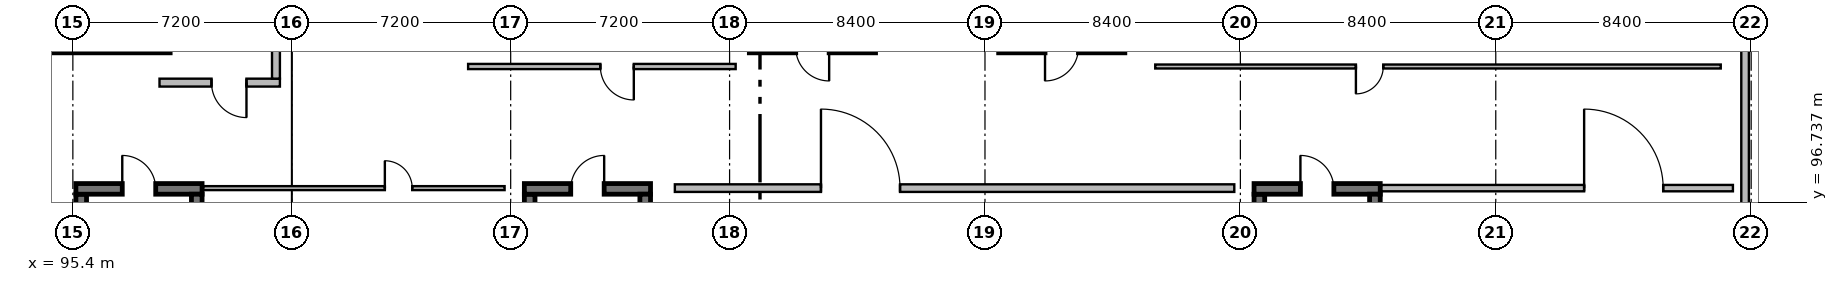
"""IFC4 building model, lengths in metres.
Left out: names, types, materials, properties, quantities, classifications, styles, units other than length and angle.
Written with IfcOpenShell. Run it as: python <this file> out.ifc"""

import sys

from ifc_helpers import new_model, si_unit, direction, frame, frame_2d, origin, place, context, subcontext, project, spatial, rectangle, extrude, element, fill, save


model = new_model("IFC4")
c1 = context("Model", 3, precision=1e-05, world=origin(), true_north=direction((0.0, 1.0)))
c2 = subcontext(c1, "Body", "Model", "MODEL_VIEW")
j1 = project(units=[si_unit("LENGTHUNIT", "METRE"), si_unit("PLANEANGLEUNIT", "RADIAN")], contexts=[c1])
p1 = place(None, origin())
s1 = spatial("IfcSite", under=j1, at=p1, CompositionType="ELEMENT")
p2 = place(p1, origin())
s2 = spatial("IfcBuilding", under=s1, at=p2, CompositionType="ELEMENT")
p3 = place(p2, origin())
s3 = spatial("IfcBuildingStorey", under=s2, at=p3, CompositionType="ELEMENT", Elevation=0.0)
p4 = place(p3, frame((98.6, 101.825, 0.0), z_axis=(0.0, 0.0, 1.0), x_axis=(-1.0, 0.0, 0.0)))
e1 = element("IfcWall", 1, at=p4, inside=s3, PredefinedType="SOLIDWALL", context=c2, shape_type="SweptSolid", body=[
    extrude(rectangle(XDim=4.15, YDim=0.35, at=frame_2d((2.075, 0.0))), origin(), (0.0, 0.0, 1.0), 4.8),
])
p5 = place(p3, frame((95.675, 89.2, 0.0), z_axis=(0.0, 0.0, 1.0), x_axis=(0.0, 1.0, 0.0)))
e2 = element("IfcWall", 2, at=p5, inside=s3, PredefinedType="SOLIDWALL", context=c2, shape_type="SweptSolid", body=[
    extrude(rectangle(XDim=7.8, YDim=0.35, at=frame_2d((3.9, 0.0))), origin(), (0.0, 0.0, 1.0), 4.54),
])
p6 = place(p3, frame((95.5, 97.175, 0.0), z_axis=(0.0, 0.0, 1.0), x_axis=(1.0, 0.0, 0.0)))
e3 = element("IfcWall", 3, at=p6, inside=s3, PredefinedType="SOLIDWALL", context=c2, shape_type="SweptSolid", body=[
    extrude(rectangle(XDim=4.15, YDim=0.35, at=frame_2d((2.075, 0.0))), origin(), (0.0, 0.0, 1.0), 4.54),
])
p7 = place(p6, frame((1.525, 0.0, 0.0)))
e4 = element("IfcOpeningElement", 4, at=p7, cuts=e3, PredefinedType="OPENING", context=c2, shape_type="SweptSolid", body=[
    extrude(rectangle(XDim=1.1, YDim=2.15, at=frame_2d((0.55, 1.075))), frame((0.0, 0.195, 0.0), z_axis=(0.0, -1.0, 0.0), x_axis=(1.0, 0.0, 0.0)), (0.0, 0.0, 1.0), 0.39),
])
p8 = place(p3, frame((99.475, 97.0, 0.0), z_axis=(0.0, 0.0, 1.0), x_axis=(0.0, -1.0, 0.0)))
e5 = element("IfcWall", 5, at=p8, inside=s3, PredefinedType="SOLIDWALL", context=c2, shape_type="SweptSolid", body=[
    extrude(rectangle(XDim=7.8, YDim=0.35, at=frame_2d((3.9, 0.0))), origin(), (0.0, 0.0, 1.0), 4.54),
])
p9 = place(p3, frame((102.21, 100.67, 0.0), z_axis=(0.0, 0.0, 1.0), x_axis=(-1.0, 0.0, 0.0)))
e6 = element("IfcWall", 6, at=p9, inside=s3, PredefinedType="SOLIDWALL", context=c2, shape_type="SweptSolid", body=[
    extrude(rectangle(XDim=3.96, YDim=0.26, at=frame_2d((1.98, 0.0))), origin(), (0.0, 0.0, 1.0), 4.54),
])
p10 = place(p9, frame((1.1, 0.0, 0.0)))
e7 = element("IfcOpeningElement", 7, at=p10, cuts=e6, PredefinedType="OPENING", context=c2, shape_type="SweptSolid", body=[
    extrude(rectangle(XDim=1.15, YDim=2.2, at=frame_2d((0.575, 1.1))), frame((0.0, 0.15, 0.0), z_axis=(0.0, -1.0, 0.0), x_axis=(1.0, 0.0, 0.0)), (0.0, 0.0, 1.0), 0.3),
])
p11 = place(p3, frame((102.08, 106.65, 0.0), z_axis=(0.0, 0.0, 1.0), x_axis=(0.0, -1.0, 0.0)))
e8 = element("IfcWall", 8, at=p11, inside=s3, PredefinedType="SOLIDWALL", context=c2, shape_type="SweptSolid", body=[
    extrude(rectangle(XDim=5.85, YDim=0.26, at=frame_2d((2.925, 0.0))), origin(), (0.0, 0.0, 1.0), 4.54),
])
p12 = place(p3, frame((121.8, 101.825, 0.0), z_axis=(0.0, 0.0, 1.0), x_axis=(-1.0, 0.0, 0.0)))
e9 = element("IfcWall", 9, at=p12, inside=s3, PredefinedType="SOLIDWALL", context=c2, shape_type="SweptSolid", body=[
    extrude(rectangle(XDim=4.15, YDim=0.35, at=frame_2d((2.075, 0.0))), origin(), (0.0, 0.0, 1.0), 4.8),
])
p13 = place(p12, frame((1.525, 0.0, 0.0)))
e10 = element("IfcOpeningElement", 10, at=p13, cuts=e9, PredefinedType="OPENING", context=c2, shape_type="SweptSolid", body=[
    extrude(rectangle(XDim=1.1, YDim=2.15, at=frame_2d((0.55, 1.075))), frame((0.0, 0.195, 0.0), z_axis=(0.0, -1.0, 0.0), x_axis=(1.0, 0.0, 0.0)), (0.0, 0.0, 1.0), 0.39),
])
p14 = place(p3, frame((130.0, 101.825, 0.0), z_axis=(0.0, 0.0, 1.0), x_axis=(-1.0, 0.0, 0.0)))
e11 = element("IfcWall", 11, at=p14, inside=s3, PredefinedType="SOLIDWALL", context=c2, shape_type="SweptSolid", body=[
    extrude(rectangle(XDim=4.15, YDim=0.35, at=frame_2d((2.075, 0.0))), origin(), (0.0, 0.0, 1.0), 4.54),
])
p15 = place(p14, frame((1.525, 0.0, 0.0)))
e12 = element("IfcOpeningElement", 12, at=p15, cuts=e11, PredefinedType="OPENING", context=c2, shape_type="SweptSolid", body=[
    extrude(rectangle(XDim=1.1, YDim=2.15, at=frame_2d((0.55, 1.075))), frame((0.0, 0.195, 0.0), z_axis=(0.0, -1.0, 0.0), x_axis=(1.0, 0.0, 0.0)), (0.0, 0.0, 1.0), 0.39),
])
p16 = place(p3, frame((110.425, 89.2, 0.0), z_axis=(0.0, 0.0, 1.0), x_axis=(0.0, 1.0, 0.0)))
e13 = element("IfcWall", 13, at=p16, inside=s3, PredefinedType="SOLIDWALL", context=c2, shape_type="SweptSolid", body=[
    extrude(rectangle(XDim=7.8, YDim=0.35, at=frame_2d((3.9, 0.0))), origin(), (0.0, 0.0, 1.0), 4.8),
])
p17 = place(p3, frame((110.25, 97.175, 0.0), z_axis=(0.0, 0.0, 1.0), x_axis=(1.0, 0.0, 0.0)))
e14 = element("IfcWall", 14, at=p17, inside=s3, PredefinedType="SOLIDWALL", context=c2, shape_type="SweptSolid", body=[
    extrude(rectangle(XDim=4.15, YDim=0.35, at=frame_2d((2.075, 0.0))), origin(), (0.0, 0.0, 1.0), 4.8),
])
p18 = place(p17, frame((1.525, 0.0, 0.0)))
e15 = element("IfcOpeningElement", 15, at=p18, cuts=e14, PredefinedType="OPENING", context=c2, shape_type="SweptSolid", body=[
    extrude(rectangle(XDim=1.1, YDim=2.15, at=frame_2d((0.55, 1.075))), frame((0.0, 0.195, 0.0), z_axis=(0.0, -1.0, 0.0), x_axis=(1.0, 0.0, 0.0)), (0.0, 0.0, 1.0), 0.39),
])
p19 = place(p3, frame((114.225, 97.0, 0.0), z_axis=(0.0, 0.0, 1.0), x_axis=(0.0, -1.0, 0.0)))
e16 = element("IfcWall", 16, at=p19, inside=s3, PredefinedType="SOLIDWALL", context=c2, shape_type="SweptSolid", body=[
    extrude(rectangle(XDim=7.8, YDim=0.35, at=frame_2d((3.9, 0.0))), origin(), (0.0, 0.0, 1.0), 4.8),
])
p20 = place(p3, frame((134.425, 89.2, 0.0), z_axis=(0.0, 0.0, 1.0), x_axis=(0.0, 1.0, 0.0)))
e17 = element("IfcWall", 17, at=p20, inside=s3, PredefinedType="SOLIDWALL", context=c2, shape_type="SweptSolid", body=[
    extrude(rectangle(XDim=7.8, YDim=0.35, at=frame_2d((3.9, 0.0))), origin(), (0.0, 0.0, 1.0), 4.56),
])
p21 = place(p3, frame((134.25, 97.175, 0.0), z_axis=(0.0, 0.0, 1.0), x_axis=(1.0, 0.0, 0.0)))
e18 = element("IfcWall", 18, at=p21, inside=s3, PredefinedType="SOLIDWALL", context=c2, shape_type="SweptSolid", body=[
    extrude(rectangle(XDim=4.15, YDim=0.35, at=frame_2d((2.075, 0.0))), origin(), (0.0, 0.0, 1.0), 4.56),
])
p22 = place(p21, frame((1.525, 0.0, 0.0)))
e19 = element("IfcOpeningElement", 19, at=p22, cuts=e18, PredefinedType="OPENING", context=c2, shape_type="SweptSolid", body=[
    extrude(rectangle(XDim=1.1, YDim=2.15, at=frame_2d((0.55, 1.075))), frame((0.0, 0.195, 0.0), z_axis=(0.0, -1.0, 0.0), x_axis=(1.0, 0.0, 0.0)), (0.0, 0.0, 1.0), 0.39),
])
p23 = place(p3, frame((138.225, 97.0, 0.0), z_axis=(0.0, 0.0, 1.0), x_axis=(0.0, -1.0, 0.0)))
e20 = element("IfcWall", 20, at=p23, inside=s3, PredefinedType="SOLIDWALL", context=c2, shape_type="SweptSolid", body=[
    extrude(rectangle(XDim=7.8, YDim=0.35, at=frame_2d((3.9, 0.0))), origin(), (0.0, 0.0, 1.0), 4.56),
])
p24 = place(p3, frame((115.2, 97.2, 0.0), z_axis=(0.0, 0.0, 1.0), x_axis=(1.0, 0.0, 0.0)))
e21 = element("IfcWall", 21, at=p24, inside=s3, PredefinedType="PARTITIONING", context=c2, shape_type="SweptSolid", body=[
    extrude(rectangle(XDim=18.4, YDim=0.25, at=frame_2d((9.2, 0.0))), origin(), (0.0, 0.0, 1.0), 4.54),
])
p25 = place(p24, frame((4.806, 0.0, 0.0)))
e22 = element("IfcOpeningElement", 22, at=p25, cuts=e21, PredefinedType="OPENING", context=c2, shape_type="SweptSolid", body=[
    extrude(rectangle(XDim=2.6, YDim=3.2, at=frame_2d((1.3, 1.6))), frame((0.0, 0.145, 0.0), z_axis=(0.0, -1.0, 0.0), x_axis=(1.0, 0.0, 0.0)), (0.0, 0.0, 1.0), 0.29),
])
p26 = place(p3, frame((150.4, 96.57, 0.0), z_axis=(0.0, 0.0, 1.0), x_axis=(0.0, 1.0, 0.0)))
e23 = element("IfcWall", 23, at=p26, inside=s3, PredefinedType="PARTITIONING", context=c2, shape_type="SweptSolid", body=[
    extrude(rectangle(XDim=7.06, YDim=0.25, at=frame_2d((3.53, 0.0))), origin(), (0.0, 0.0, 1.0), 3.86),
])
p27 = place(p3, frame((117.2, 101.2, 0.0), z_axis=(0.0, 0.0, 1.0), x_axis=(-1.0, 0.0, 0.0)))
e24 = element("IfcWall", 24, at=p27, inside=s3, PredefinedType="PARTITIONING", context=c2, shape_type="SweptSolid", body=[
    extrude(rectangle(XDim=8.8, YDim=0.17, at=frame_2d((4.4, 0.0))), origin(), (0.0, 0.0, 1.0), 4.54),
])
p28 = place(p27, frame((3.35, 0.0, 0.0)))
e25 = element("IfcOpeningElement", 25, at=p28, cuts=e24, PredefinedType="OPENING", context=c2, shape_type="SweptSolid", body=[
    extrude(rectangle(XDim=1.1, YDim=2.25, at=frame_2d((0.55, 1.125))), frame((0.0, 0.105, 0.0), z_axis=(0.0, -1.0, 0.0), x_axis=(1.0, 0.0, 0.0)), (0.0, 0.0, 1.0), 0.21),
])
p29 = place(p3, frame((149.6, 101.2, 0.0), z_axis=(0.0, 0.0, 1.0), x_axis=(-1.0, 0.0, 0.0)))
e26 = element("IfcWall", 26, at=p29, inside=s3, PredefinedType="PARTITIONING", context=c2, shape_type="SweptSolid", body=[
    extrude(rectangle(XDim=18.6, YDim=0.13, at=frame_2d((9.3, 0.0))), origin(), (0.0, 0.0, 1.0), 4.54),
])
p30 = place(p29, frame((11.1, 0.0, 0.0)))
e27 = element("IfcOpeningElement", 27, at=p30, cuts=e26, PredefinedType="OPENING", context=c2, shape_type="SweptSolid", body=[
    extrude(rectangle(XDim=0.9, YDim=2.15, at=frame_2d((0.45, 1.075))), frame((0.0, 0.085, 0.0), z_axis=(0.0, -1.0, 0.0), x_axis=(1.0, 0.0, 0.0)), (0.0, 0.0, 1.0), 0.17),
])
p31 = place(p3, frame((99.69, 97.2, 0.0), z_axis=(0.0, 0.0, 1.0), x_axis=(1.0, 0.0, 0.0)))
e28 = element("IfcWall", 28, at=p31, inside=s3, PredefinedType="PARTITIONING", context=c2, shape_type="SweptSolid", body=[
    extrude(rectangle(XDim=9.91, YDim=0.13, at=frame_2d((4.955, 0.0))), origin(), (0.0, 0.0, 1.0), 4.54),
])
p32 = place(p31, frame((5.971, 0.0, 0.0)))
e29 = element("IfcOpeningElement", 29, at=p32, cuts=e28, PredefinedType="OPENING", context=c2, shape_type="SweptSolid", body=[
    extrude(rectangle(XDim=0.9, YDim=2.15, at=frame_2d((0.45, 1.075))), frame((0.0, 0.085, 0.0), z_axis=(0.0, -1.0, 0.0), x_axis=(1.0, 0.0, 0.0)), (0.0, 0.0, 1.0), 0.17),
])
p33 = place(p3, frame((138.44, 97.2, 0.0), z_axis=(0.0, 0.0, 1.0), x_axis=(1.0, 0.0, 0.0)))
e30 = element("IfcWall", 30, at=p33, inside=s3, PredefinedType="PARTITIONING", context=c2, shape_type="SweptSolid", body=[
    extrude(rectangle(XDim=11.56, YDim=0.21, at=frame_2d((5.78, 0.0))), origin(), (0.0, 0.0, 1.0), 4.56),
])
p34 = place(p33, frame((6.667, 0.0, 0.0)))
e31 = element("IfcOpeningElement", 31, at=p34, cuts=e30, PredefinedType="OPENING", context=c2, shape_type="SweptSolid", body=[
    extrude(rectangle(XDim=2.6, YDim=3.2, at=frame_2d((1.3, 1.6))), frame((0.0, 0.125, 0.0), z_axis=(0.0, -1.0, 0.0), x_axis=(1.0, 0.0, 0.0)), (0.0, 0.0, 1.0), 0.25),
])
p35 = place(p7, origin())
e32 = element("IfcDoor", 32, at=p35, inside=s3, OperationType="SINGLE_SWING_LEFT", PredefinedType="DOOR", context=c2, shape_type="SweptSolid", body=[
    extrude(rectangle(XDim=1.1, YDim=2.15, at=frame_2d((0.55, 1.075))), frame((0.0, 0.025, 0.0), z_axis=(0.0, -1.0, 0.0), x_axis=(1.0, 0.0, 0.0)), (0.0, 0.0, 1.0), 0.05),
])
fill(e4, e32)
p36 = place(p10, origin())
e33 = element("IfcDoor", 33, at=p36, inside=s3, OperationType="SINGLE_SWING_LEFT", PredefinedType="DOOR", context=c2, shape_type="SweptSolid", body=[
    extrude(rectangle(XDim=1.15, YDim=2.2, at=frame_2d((0.575, 1.1))), frame((0.0, 0.025, 0.0), z_axis=(0.0, -1.0, 0.0), x_axis=(1.0, 0.0, 0.0)), (0.0, 0.0, 1.0), 0.05),
])
fill(e7, e33)
p37 = place(p18, origin())
e34 = element("IfcDoor", 34, at=p37, inside=s3, OperationType="SINGLE_SWING_RIGHT", PredefinedType="DOOR", context=c2, shape_type="SweptSolid", body=[
    extrude(rectangle(XDim=1.1, YDim=2.15, at=frame_2d((0.55, 1.075))), frame((0.0, 0.025, 0.0), z_axis=(0.0, -1.0, 0.0), x_axis=(1.0, 0.0, 0.0)), (0.0, 0.0, 1.0), 0.05),
])
fill(e15, e34)
p38 = place(p22, origin())
e35 = element("IfcDoor", 35, at=p38, inside=s3, OperationType="SINGLE_SWING_LEFT", PredefinedType="DOOR", context=c2, shape_type="SweptSolid", body=[
    extrude(rectangle(XDim=1.1, YDim=2.15, at=frame_2d((0.55, 1.075))), frame((0.0, 0.025, 0.0), z_axis=(0.0, -1.0, 0.0), x_axis=(1.0, 0.0, 0.0)), (0.0, 0.0, 1.0), 0.05),
])
fill(e19, e35)
p39 = place(p25, origin())
e36 = element("IfcDoor", 36, at=p39, inside=s3, OperationType="DOUBLE_DOOR_SINGLE_SWING", PredefinedType="DOOR", context=c2, shape_type="SweptSolid", body=[
    extrude(rectangle(XDim=2.6, YDim=3.2, at=frame_2d((1.3, 1.6))), frame((0.0, 0.025, 0.0), z_axis=(0.0, -1.0, 0.0), x_axis=(1.0, 0.0, 0.0)), (0.0, 0.0, 1.0), 0.05),
])
fill(e22, e36)
p40 = place(p28, origin())
e37 = element("IfcDoor", 37, at=p40, inside=s3, OperationType="SINGLE_SWING_LEFT", PredefinedType="DOOR", context=c2, shape_type="SweptSolid", body=[
    extrude(rectangle(XDim=1.1, YDim=2.25, at=frame_2d((0.55, 1.125))), frame((0.0, 0.025, 0.0), z_axis=(0.0, -1.0, 0.0), x_axis=(1.0, 0.0, 0.0)), (0.0, 0.0, 1.0), 0.05),
])
fill(e25, e37)
p41 = place(p30, origin())
e38 = element("IfcDoor", 38, at=p41, inside=s3, OperationType="SINGLE_SWING_RIGHT", PredefinedType="DOOR", context=c2, shape_type="SweptSolid", body=[
    extrude(rectangle(XDim=0.9, YDim=2.15, at=frame_2d((0.45, 1.075))), frame((0.0, 0.025, 0.0), z_axis=(0.0, -1.0, 0.0), x_axis=(1.0, 0.0, 0.0)), (0.0, 0.0, 1.0), 0.05),
])
fill(e27, e38)
p42 = place(p32, origin())
e39 = element("IfcDoor", 39, at=p42, inside=s3, OperationType="SINGLE_SWING_LEFT", PredefinedType="DOOR", context=c2, shape_type="SweptSolid", body=[
    extrude(rectangle(XDim=0.9, YDim=2.15, at=frame_2d((0.45, 1.075))), frame((0.0, 0.025, 0.0), z_axis=(0.0, -1.0, 0.0), x_axis=(1.0, 0.0, 0.0)), (0.0, 0.0, 1.0), 0.05),
])
fill(e29, e39)
p43 = place(p34, origin())
e40 = element("IfcDoor", 40, at=p43, inside=s3, OperationType="DOUBLE_DOOR_SINGLE_SWING", PredefinedType="DOOR", context=c2, shape_type="SweptSolid", body=[
    extrude(rectangle(XDim=2.6, YDim=3.2, at=frame_2d((1.3, 1.6))), frame((0.0, 0.025, 0.0), z_axis=(0.0, -1.0, 0.0), x_axis=(1.0, 0.0, 0.0)), (0.0, 0.0, 1.0), 0.05),
])
fill(e31, e40)
save(model, sys.argv[1])
